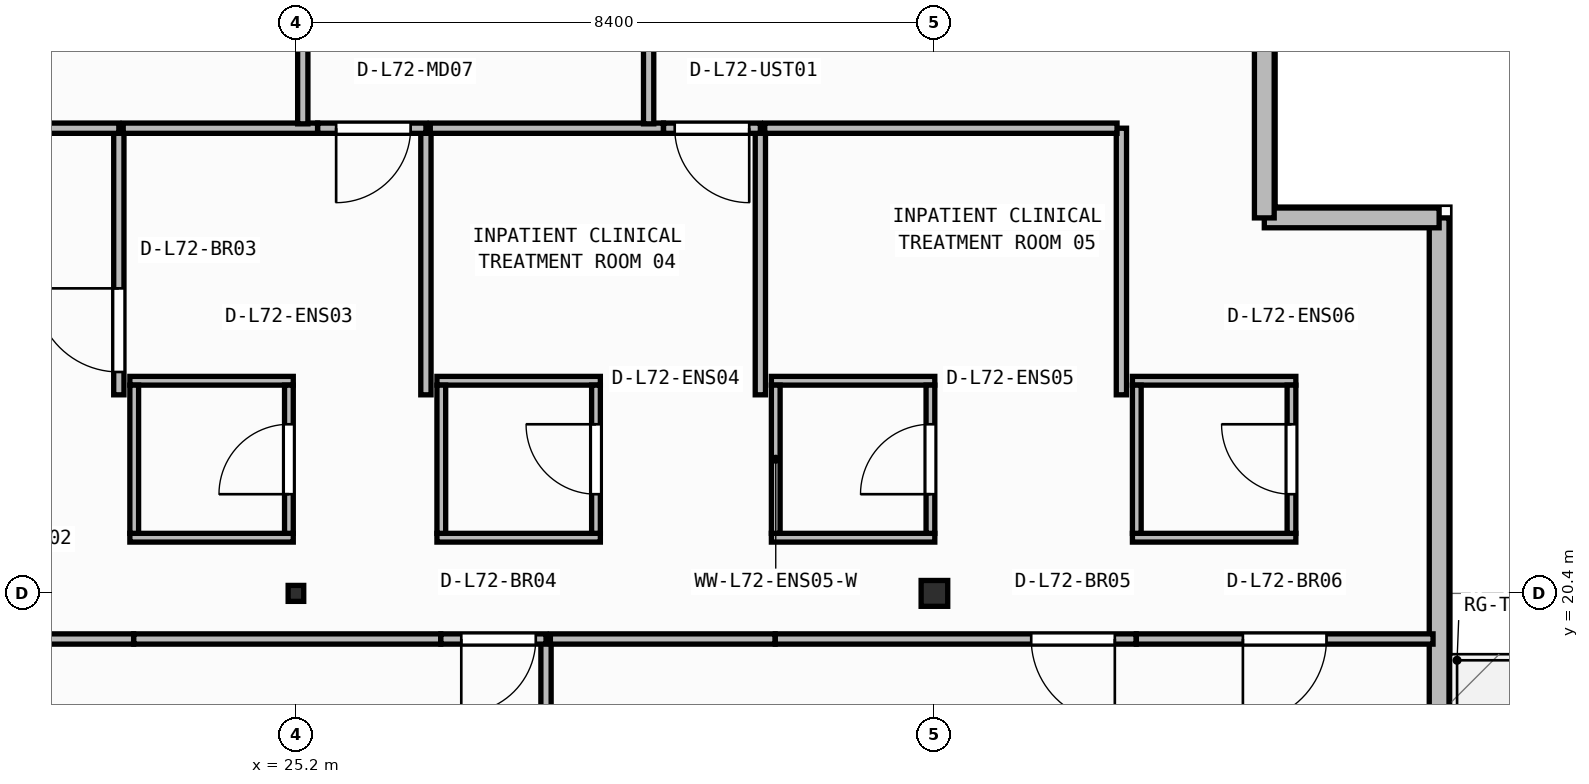
"""IFC4 building model, lengths in metres.
Left out: names, types, materials, properties, quantities, classifications, styles, units other than length and angle.
Written with IfcOpenShell. Run it as: python <this file> out.ifc"""

import sys

from ifc_helpers import new_model, si_unit, direction, frame, frame_2d, origin, origin_2d, place, context, subcontext, project, spatial, rectangle, i_section, extrude, element, fill, save


model = new_model("IFC4")
c1 = context("Model", 3, precision=1e-05, world=origin(), true_north=direction((0.0, 1.0)))
c2 = subcontext(c1, "Body", "Model", "MODEL_VIEW")
j1 = project(units=[si_unit("LENGTHUNIT", "METRE"), si_unit("PLANEANGLEUNIT", "RADIAN")], contexts=[c1])
p1 = place(None, origin())
s1 = spatial("IfcSite", under=j1, at=p1, CompositionType="ELEMENT")
p2 = place(p1, origin())
s2 = spatial("IfcBuilding", under=s1, at=p2, CompositionType="ELEMENT")
p3 = place(p2, frame((0.0, 0.0, 292.1)))
s3 = spatial("IfcBuildingStorey", under=s2, at=p3, CompositionType="ELEMENT", Elevation=292.1)
p4 = place(p3, frame((25.2, 20.4, 0.0), z_axis=(0.0, 0.0, 1.0), x_axis=(1.0, 0.0, 0.0)))
e1 = element("IfcColumn", 1, at=p4, inside=s3, PredefinedType="COLUMN", context=c2, shape_type="SweptSolid", body=[
    extrude(i_section(OverallWidth=0.205, OverallDepth=0.21, WebThickness=0.009, FlangeThickness=0.014, FilletRadius=0.011, at=origin_2d()), origin(), (0.0, 0.0, 1.0), 3.95),
])
p5 = place(p3, frame((33.6, 20.4, 0.0), z_axis=(0.0, 0.0, 1.0), x_axis=(1.0, 0.0, 0.0)))
e2 = element("IfcColumn", 2, at=p5, inside=s3, PredefinedType="COLUMN", context=c2, shape_type="SweptSolid", body=[
    extrude(i_section(OverallWidth=0.35, OverallDepth=0.34, WebThickness=0.016, FlangeThickness=0.028, at=origin_2d()), origin(), (0.0, 0.0, 1.0), 3.95),
])
p6 = place(p3, frame((40.24, 4.86, 0.0), z_axis=(0.0, 0.0, 1.0), x_axis=(0.0, 1.0, 0.0)))
e3 = element("IfcWall", 3, at=p6, inside=s3, PredefinedType="STANDARD", context=c2, shape_type="SweptSolid", body=[
    extrude(rectangle(XDim=20.48, YDim=0.26, at=frame_2d((10.24, 0.0))), origin(), (0.0, 0.0, 1.0), 3.71),
])
p7 = place(p6, frame((11.44, 0.0, 0.0)))
e4 = element("IfcOpeningElement", 4, at=p7, cuts=e3, PredefinedType="OPENING", context=c2, shape_type="SweptSolid", body=[
    extrude(rectangle(XDim=1.3, YDim=2.15, at=frame_2d((0.65, 1.075))), frame((0.0, 0.14, 0.0), z_axis=(0.0, -1.0, 0.0), x_axis=(1.0, 0.0, 0.0)), (0.0, 0.0, 1.0), 0.28),
])
p8 = place(p3, frame((40.24, 25.34, 0.0), z_axis=(0.0, 0.0, 1.0), x_axis=(-1.0, 0.0, 0.0)))
e5 = element("IfcWall", 5, at=p8, inside=s3, PredefinedType="STANDARD", context=c2, shape_type="SweptSolid", body=[
    extrude(rectangle(XDim=2.3, YDim=0.26, at=frame_2d((1.15, 0.0))), origin(), (0.0, 0.0, 1.0), 3.71),
])
p9 = place(p3, frame((37.94, 25.34, 0.0), z_axis=(0.0, 0.0, 1.0), x_axis=(0.0, 1.0, 0.0)))
e6 = element("IfcWall", 6, at=p9, inside=s3, PredefinedType="STANDARD", context=c2, shape_type="SweptSolid", body=[
    extrude(rectangle(XDim=2.321, YDim=0.26, at=frame_2d((1.161, 0.0))), origin(), (0.0, 0.0, 1.0), 3.71),
])
for number, where, z_axis, x_axis in (
    (7, (23.015, 21.133, 0.0), (0.0, 0.0, 1.0), (1.0, 0.0, 0.0)),
    (8, (23.015, 23.198, 0.0), (0.0, 0.0, 1.0), (1.0, 0.0, 0.0)),
):
    element("IfcWall", number, at=place(p3, frame(where, z_axis=z_axis, x_axis=x_axis)), inside=s3, PredefinedType="PARTITIONING", context=c2, shape_type="SweptSolid", body=[
        extrude(rectangle(XDim=2.15, YDim=0.115, at=frame_2d((1.075, 0.0))), origin(), (0.0, 0.0, 1.0), 3.71),
    ])
p10 = place(p3, frame((23.073, 21.19, 0.0), z_axis=(0.0, 0.0, 1.0), x_axis=(0.0, 1.0, 0.0)))
e9 = element("IfcWall", 9, at=p10, inside=s3, PredefinedType="PARTITIONING", context=c2, shape_type="SweptSolid", body=[
    extrude(rectangle(XDim=1.95, YDim=0.115, at=frame_2d((0.975, 0.0))), origin(), (0.0, 0.0, 1.0), 3.71),
])
p11 = place(p3, frame((25.107, 21.19, 0.0), z_axis=(0.0, 0.0, 1.0), x_axis=(0.0, 1.0, 0.0)))
e10 = element("IfcWall", 10, at=p11, inside=s3, PredefinedType="PARTITIONING", context=c2, shape_type="SweptSolid", body=[
    extrude(rectangle(XDim=1.95, YDim=0.115, at=frame_2d((0.975, 0.0))), origin(), (0.0, 0.0, 1.0), 3.157),
])
p12 = place(p11, frame((0.515, 0.0, 0.0)))
e11 = element("IfcOpeningElement", 11, at=p12, cuts=e10, PredefinedType="OPENING", context=c2, shape_type="SweptSolid", body=[
    extrude(rectangle(XDim=0.92, YDim=2.1, at=frame_2d((0.46, 1.05))), frame((0.0, 0.067, 0.0), z_axis=(0.0, -1.0, 0.0), x_axis=(1.0, 0.0, 0.0)), (0.0, 0.0, 1.0), 0.135),
])
for number, where, z_axis, x_axis in (
    (12, (27.055, 21.133, 0.0), (0.0, 0.0, 1.0), (1.0, 0.0, 0.0)),
    (13, (27.055, 23.198, 0.0), (0.0, 0.0, 1.0), (1.0, 0.0, 0.0)),
):
    element("IfcWall", number, at=place(p3, frame(where, z_axis=z_axis, x_axis=x_axis)), inside=s3, PredefinedType="PARTITIONING", context=c2, shape_type="SweptSolid", body=[
        extrude(rectangle(XDim=2.15, YDim=0.115, at=frame_2d((1.075, 0.0))), origin(), (0.0, 0.0, 1.0), 3.71),
    ])
p13 = place(p3, frame((27.113, 21.19, 0.0), z_axis=(0.0, 0.0, 1.0), x_axis=(0.0, 1.0, 0.0)))
e14 = element("IfcWall", 14, at=p13, inside=s3, PredefinedType="PARTITIONING", context=c2, shape_type="SweptSolid", body=[
    extrude(rectangle(XDim=1.95, YDim=0.115, at=frame_2d((0.975, 0.0))), origin(), (0.0, 0.0, 1.0), 3.71),
])
p14 = place(p3, frame((29.147, 21.19, 0.0), z_axis=(0.0, 0.0, 1.0), x_axis=(0.0, 1.0, 0.0)))
e15 = element("IfcWall", 15, at=p14, inside=s3, PredefinedType="PARTITIONING", context=c2, shape_type="SweptSolid", body=[
    extrude(rectangle(XDim=1.95, YDim=0.115, at=frame_2d((0.975, 0.0))), origin(), (0.0, 0.0, 1.0), 3.71),
])
p15 = place(p14, frame((0.515, 0.0, 0.0)))
e16 = element("IfcOpeningElement", 16, at=p15, cuts=e15, PredefinedType="OPENING", context=c2, shape_type="SweptSolid", body=[
    extrude(rectangle(XDim=0.92, YDim=2.1, at=frame_2d((0.46, 1.05))), frame((0.0, 0.067, 0.0), z_axis=(0.0, -1.0, 0.0), x_axis=(1.0, 0.0, 0.0)), (0.0, 0.0, 1.0), 0.135),
])
for number, where, z_axis, x_axis in (
    (17, (31.455, 21.133, 0.0), (0.0, 0.0, 1.0), (1.0, 0.0, 0.0)),
    (18, (31.455, 23.198, 0.0), (0.0, 0.0, 1.0), (1.0, 0.0, 0.0)),
):
    element("IfcWall", number, at=place(p3, frame(where, z_axis=z_axis, x_axis=x_axis)), inside=s3, PredefinedType="PARTITIONING", context=c2, shape_type="SweptSolid", body=[
        extrude(rectangle(XDim=2.15, YDim=0.115, at=frame_2d((1.075, 0.0))), origin(), (0.0, 0.0, 1.0), 3.71),
    ])
p16 = place(p3, frame((31.512, 21.19, 0.0), z_axis=(0.0, 0.0, 1.0), x_axis=(0.0, 1.0, 0.0)))
e19 = element("IfcWall", 19, at=p16, inside=s3, PredefinedType="PARTITIONING", context=c2, shape_type="SweptSolid", body=[
    extrude(rectangle(XDim=1.95, YDim=0.115, at=frame_2d((0.975, 0.0))), origin(), (0.0, 0.0, 1.0), 3.71),
])
p17 = place(p3, frame((33.548, 21.19, 0.0), z_axis=(0.0, 0.0, 1.0), x_axis=(0.0, 1.0, 0.0)))
e20 = element("IfcWall", 20, at=p17, inside=s3, PredefinedType="PARTITIONING", context=c2, shape_type="SweptSolid", body=[
    extrude(rectangle(XDim=1.95, YDim=0.115, at=frame_2d((0.975, 0.0))), origin(), (0.0, 0.0, 1.0), 3.71),
])
p18 = place(p17, frame((0.515, 0.0, 0.0)))
e21 = element("IfcOpeningElement", 21, at=p18, cuts=e20, PredefinedType="OPENING", context=c2, shape_type="SweptSolid", body=[
    extrude(rectangle(XDim=0.92, YDim=2.1, at=frame_2d((0.46, 1.05))), frame((0.0, 0.067, 0.0), z_axis=(0.0, -1.0, 0.0), x_axis=(1.0, 0.0, 0.0)), (0.0, 0.0, 1.0), 0.135),
])
for number, where, z_axis, x_axis in (
    (22, (36.205, 21.133, 0.0), (0.0, 0.0, 1.0), (1.0, 0.0, 0.0)),
    (23, (36.205, 23.198, 0.0), (0.0, 0.0, 1.0), (1.0, 0.0, 0.0)),
):
    element("IfcWall", number, at=place(p3, frame(where, z_axis=z_axis, x_axis=x_axis)), inside=s3, PredefinedType="PARTITIONING", context=c2, shape_type="SweptSolid", body=[
        extrude(rectangle(XDim=2.15, YDim=0.115, at=frame_2d((1.075, 0.0))), origin(), (0.0, 0.0, 1.0), 3.71),
    ])
p19 = place(p3, frame((36.262, 21.19, 0.0), z_axis=(0.0, 0.0, 1.0), x_axis=(0.0, 1.0, 0.0)))
e24 = element("IfcWall", 24, at=p19, inside=s3, PredefinedType="PARTITIONING", context=c2, shape_type="SweptSolid", body=[
    extrude(rectangle(XDim=1.95, YDim=0.115, at=frame_2d((0.975, 0.0))), origin(), (0.0, 0.0, 1.0), 3.71),
])
p20 = place(p3, frame((38.298, 21.19, 0.0), z_axis=(0.0, 0.0, 1.0), x_axis=(0.0, 1.0, 0.0)))
e25 = element("IfcWall", 25, at=p20, inside=s3, PredefinedType="PARTITIONING", context=c2, shape_type="SweptSolid", body=[
    extrude(rectangle(XDim=1.95, YDim=0.115, at=frame_2d((0.975, 0.0))), origin(), (0.0, 0.0, 1.0), 3.71),
])
p21 = place(p20, frame((0.515, 0.0, 0.0)))
e26 = element("IfcOpeningElement", 26, at=p21, cuts=e25, PredefinedType="OPENING", context=c2, shape_type="SweptSolid", body=[
    extrude(rectangle(XDim=0.92, YDim=2.1, at=frame_2d((0.46, 1.05))), frame((0.0, 0.067, 0.0), z_axis=(0.0, -1.0, 0.0), x_axis=(1.0, 0.0, 0.0)), (0.0, 0.0, 1.0), 0.135),
])
p22 = place(p3, frame((28.49, 14.76, 0.0), z_axis=(0.0, 0.0, 1.0), x_axis=(0.0, 1.0, 0.0)))
e27 = element("IfcWall", 27, at=p22, inside=s3, PredefinedType="PARTITIONING", context=c2, shape_type="SweptSolid", body=[
    extrude(rectangle(XDim=5.04, YDim=0.135, at=frame_2d((2.52, 0.0))), origin(), (0.0, 0.0, 1.0), 3.71),
])
p23 = place(p3, frame((23.065, 19.8, 0.0), z_axis=(0.0, 0.0, 1.0), x_axis=(-1.0, 0.0, 0.0)))
e28 = element("IfcWall", 28, at=p23, inside=s3, PredefinedType="PARTITIONING", context=c2, shape_type="SweptSolid", body=[
    extrude(rectangle(XDim=4.748, YDim=0.135, at=frame_2d((2.374, 0.0))), origin(), (0.0, 0.0, 1.0), 3.71),
])
p24 = place(p23, frame((1.499, 0.0, 0.0)))
e29 = element("IfcOpeningElement", 29, at=p24, cuts=e28, PredefinedType="OPENING", context=c2, shape_type="SweptSolid", body=[
    extrude(rectangle(XDim=1.1, YDim=2.1, at=frame_2d((0.55, 1.05))), frame((0.0, 0.077, 0.0), z_axis=(0.0, -1.0, 0.0), x_axis=(1.0, 0.0, 0.0)), (0.0, 0.0, 1.0), 0.155),
])
p25 = place(p3, frame((27.104, 19.8, 0.0), z_axis=(0.0, 0.0, 1.0), x_axis=(-1.0, 0.0, 0.0)))
e30 = element("IfcWall", 30, at=p25, inside=s3, PredefinedType="PARTITIONING", context=c2, shape_type="SweptSolid", body=[
    extrude(rectangle(XDim=4.038, YDim=0.135, at=frame_2d((2.019, 0.0))), origin(), (0.0, 0.0, 1.0), 3.71),
])
p26 = place(p3, frame((28.49, 19.8, 0.0), z_axis=(0.0, 0.0, 1.0), x_axis=(-1.0, 0.0, 0.0)))
e31 = element("IfcWall", 31, at=p26, inside=s3, PredefinedType="PARTITIONING", context=c2, shape_type="SweptSolid", body=[
    extrude(rectangle(XDim=1.383, YDim=0.135, at=frame_2d((0.692, 0.0))), origin(), (0.0, 0.0, 1.0), 3.71),
])
p27 = place(p26, frame((0.135, 0.0, 0.0)))
e32 = element("IfcOpeningElement", 32, at=p27, cuts=e31, PredefinedType="OPENING", context=c2, shape_type="SweptSolid", body=[
    extrude(rectangle(XDim=0.98, YDim=2.1, at=frame_2d((0.49, 1.05))), frame((0.0, 0.077, 0.0), z_axis=(0.0, -1.0, 0.0), x_axis=(1.0, 0.0, 0.0)), (0.0, 0.0, 1.0), 0.155),
])
p28 = place(p3, frame((31.505, 19.8, 0.0), z_axis=(0.0, 0.0, 1.0), x_axis=(-1.0, 0.0, 0.0)))
e33 = element("IfcWall", 33, at=p28, inside=s3, PredefinedType="PARTITIONING", context=c2, shape_type="SweptSolid", body=[
    extrude(rectangle(XDim=2.957, YDim=0.135, at=frame_2d((1.479, 0.0))), origin(), (0.0, 0.0, 1.0), 3.71),
])
p29 = place(p3, frame((36.255, 19.8, 0.0), z_axis=(0.0, 0.0, 1.0), x_axis=(-1.0, 0.0, 0.0)))
e34 = element("IfcWall", 34, at=p29, inside=s3, PredefinedType="PARTITIONING", context=c2, shape_type="SweptSolid", body=[
    extrude(rectangle(XDim=4.748, YDim=0.135, at=frame_2d((2.374, 0.0))), origin(), (0.0, 0.0, 1.0), 3.71),
])
p30 = place(p29, frame((0.281, 0.0, 0.0)))
e35 = element("IfcOpeningElement", 35, at=p30, cuts=e34, PredefinedType="OPENING", context=c2, shape_type="SweptSolid", body=[
    extrude(rectangle(XDim=1.1, YDim=2.1, at=frame_2d((0.55, 1.05))), frame((0.0, 0.077, 0.0), z_axis=(0.0, -1.0, 0.0), x_axis=(1.0, 0.0, 0.0)), (0.0, 0.0, 1.0), 0.155),
])
p31 = place(p3, frame((40.16, 19.8, 0.0), z_axis=(0.0, 0.0, 1.0), x_axis=(-1.0, 0.0, 0.0)))
e36 = element("IfcWall", 36, at=p31, inside=s3, PredefinedType="PARTITIONING", context=c2, shape_type="SweptSolid", body=[
    extrude(rectangle(XDim=3.903, YDim=0.135, at=frame_2d((1.952, 0.0))), origin(), (0.0, 0.0, 1.0), 3.71),
])
p32 = place(p31, frame((1.402, 0.0, 0.0)))
e37 = element("IfcOpeningElement", 37, at=p32, cuts=e36, PredefinedType="OPENING", context=c2, shape_type="SweptSolid", body=[
    extrude(rectangle(XDim=1.1, YDim=2.1, at=frame_2d((0.55, 1.05))), frame((0.0, 0.077, 0.0), z_axis=(0.0, -1.0, 0.0), x_axis=(1.0, 0.0, 0.0)), (0.0, 0.0, 1.0), 0.155),
])
p33 = place(p3, frame((22.87, 23.012, 0.0), z_axis=(0.0, 0.0, 1.0), x_axis=(0.0, 1.0, 0.0)))
e38 = element("IfcWall", 38, at=p33, inside=s3, PredefinedType="PARTITIONING", context=c2, shape_type="SweptSolid", body=[
    extrude(rectangle(XDim=3.508, YDim=0.135, at=frame_2d((1.754, 0.0))), origin(), (0.0, 0.0, 1.0), 3.71),
])
p34 = place(p33, frame((0.3, 0.0, 0.0)))
e39 = element("IfcOpeningElement", 39, at=p34, cuts=e38, PredefinedType="OPENING", context=c2, shape_type="SweptSolid", body=[
    extrude(rectangle(XDim=1.1, YDim=2.1, at=frame_2d((0.55, 1.05))), frame((0.0, 0.077, 0.0), z_axis=(0.0, -1.0, 0.0), x_axis=(1.0, 0.0, 0.0)), (0.0, 0.0, 1.0), 0.155),
])
p35 = place(p3, frame((22.87, 26.52, 0.0), z_axis=(0.0, 0.0, 1.0), x_axis=(-1.0, 0.0, 0.0)))
e40 = element("IfcWall", 40, at=p35, inside=s3, PredefinedType="PARTITIONING", context=c2, shape_type="SweptSolid", body=[
    extrude(rectangle(XDim=2.724, YDim=0.135, at=frame_2d((1.362, 0.0))), origin(), (0.0, 0.0, 1.0), 3.71),
])
p36 = place(p35, frame((1.393, 0.0, 0.0)))
e41 = element("IfcOpeningElement", 41, at=p36, cuts=e40, PredefinedType="OPENING", context=c2, shape_type="SweptSolid", body=[
    extrude(rectangle(XDim=1.1, YDim=2.1, at=frame_2d((0.55, 1.05))), frame((0.0, 0.077, 0.0), z_axis=(0.0, -1.0, 0.0), x_axis=(1.0, 0.0, 0.0)), (0.0, 0.0, 1.0), 0.155),
])
p37 = place(p3, frame((26.91, 23.012, 0.0), z_axis=(0.0, 0.0, 1.0), x_axis=(0.0, 1.0, 0.0)))
e42 = element("IfcWall", 42, at=p37, inside=s3, PredefinedType="PARTITIONING", context=c2, shape_type="SweptSolid", body=[
    extrude(rectangle(XDim=3.508, YDim=0.135, at=frame_2d((1.754, 0.0))), origin(), (0.0, 0.0, 1.0), 3.71),
])
p38 = place(p3, frame((25.485, 26.52, 0.0), z_axis=(0.0, 0.0, 1.0), x_axis=(-1.0, 0.0, 0.0)))
e43 = element("IfcWall", 43, at=p38, inside=s3, PredefinedType="PARTITIONING", context=c2, shape_type="SweptSolid", body=[
    extrude(rectangle(XDim=2.557, YDim=0.135, at=frame_2d((1.279, 0.0))), origin(), (0.0, 0.0, 1.0), 3.71),
])
p39 = place(p3, frame((26.91, 26.52, 0.0), z_axis=(0.0, 0.0, 1.0), x_axis=(-1.0, 0.0, 0.0)))
e44 = element("IfcWall", 44, at=p39, inside=s3, PredefinedType="PARTITIONING", context=c2, shape_type="SweptSolid", body=[
    extrude(rectangle(XDim=1.423, YDim=0.135, at=frame_2d((0.712, 0.0))), origin(), (0.0, 0.0, 1.0), 3.71),
])
p40 = place(p39, frame((0.201, 0.0, 0.0)))
e45 = element("IfcOpeningElement", 45, at=p40, cuts=e44, PredefinedType="OPENING", context=c2, shape_type="SweptSolid", body=[
    extrude(rectangle(XDim=0.98, YDim=2.1, at=frame_2d((0.49, 1.05))), frame((0.0, 0.077, 0.0), z_axis=(0.0, -1.0, 0.0), x_axis=(1.0, 0.0, 0.0)), (0.0, 0.0, 1.0), 0.155),
])
p41 = place(p3, frame((31.31, 23.012, 0.0), z_axis=(0.0, 0.0, 1.0), x_axis=(0.0, 1.0, 0.0)))
e46 = element("IfcWall", 46, at=p41, inside=s3, PredefinedType="PARTITIONING", context=c2, shape_type="SweptSolid", body=[
    extrude(rectangle(XDim=3.508, YDim=0.135, at=frame_2d((1.754, 0.0))), origin(), (0.0, 0.0, 1.0), 3.71),
])
p42 = place(p3, frame((30.035, 26.52, 0.0), z_axis=(0.0, 0.0, 1.0), x_axis=(-1.0, 0.0, 0.0)))
e47 = element("IfcWall", 47, at=p42, inside=s3, PredefinedType="PARTITIONING", context=c2, shape_type="SweptSolid", body=[
    extrude(rectangle(XDim=3.067, YDim=0.135, at=frame_2d((1.534, 0.0))), origin(), (0.0, 0.0, 1.0), 3.71),
])
p43 = place(p3, frame((31.31, 26.52, 0.0), z_axis=(0.0, 0.0, 1.0), x_axis=(-1.0, 0.0, 0.0)))
e48 = element("IfcWall", 48, at=p43, inside=s3, PredefinedType="PARTITIONING", context=c2, shape_type="SweptSolid", body=[
    extrude(rectangle(XDim=1.273, YDim=0.135, at=frame_2d((0.637, 0.0))), origin(), (0.0, 0.0, 1.0), 3.71),
])
p44 = place(p43, frame((0.147, 0.0, 0.0)))
e49 = element("IfcOpeningElement", 49, at=p44, cuts=e48, PredefinedType="OPENING", context=c2, shape_type="SweptSolid", body=[
    extrude(rectangle(XDim=0.98, YDim=2.1, at=frame_2d((0.49, 1.05))), frame((0.0, 0.077, 0.0), z_axis=(0.0, -1.0, 0.0), x_axis=(1.0, 0.0, 0.0)), (0.0, 0.0, 1.0), 0.155),
])
p45 = place(p3, frame((36.06, 23.012, 0.0), z_axis=(0.0, 0.0, 1.0), x_axis=(0.0, 1.0, 0.0)))
e50 = element("IfcWall", 50, at=p45, inside=s3, PredefinedType="PARTITIONING", context=c2, shape_type="SweptSolid", body=[
    extrude(rectangle(XDim=3.508, YDim=0.135, at=frame_2d((1.754, 0.0))), origin(), (0.0, 0.0, 1.0), 3.71),
])
p46 = place(p3, frame((36.002, 26.52, 0.0), z_axis=(0.0, 0.0, 1.0), x_axis=(-1.0, 0.0, 0.0)))
e51 = element("IfcWall", 51, at=p46, inside=s3, PredefinedType="PARTITIONING", context=c2, shape_type="SweptSolid", body=[
    extrude(rectangle(XDim=4.635, YDim=0.135, at=frame_2d((2.317, 0.0))), origin(), (0.0, 0.0, 1.0), 3.71),
])
p47 = place(p3, frame((25.29, 26.577, 0.0), z_axis=(0.0, 0.0, 1.0), x_axis=(0.0, 1.0, 0.0)))
e52 = element("IfcWall", 52, at=p47, inside=s3, PredefinedType="PARTITIONING", context=c2, shape_type="SweptSolid", body=[
    extrude(rectangle(XDim=3.051, YDim=0.135, at=frame_2d((1.525, 0.0))), origin(), (0.0, 0.0, 1.0), 3.157),
])
p48 = place(p3, frame((29.84, 26.577, 0.0), z_axis=(0.0, 0.0, 1.0), x_axis=(0.0, 1.0, 0.0)))
e53 = element("IfcWall", 53, at=p48, inside=s3, PredefinedType="PARTITIONING", context=c2, shape_type="SweptSolid", body=[
    extrude(rectangle(XDim=2.242, YDim=0.135, at=frame_2d((1.121, 0.0))), origin(), (0.0, 0.0, 1.0), 3.71),
])
p49 = place(p12, origin())
e54 = element("IfcDoor", 54, at=p49, inside=s3, OperationType="SINGLE_SWING_LEFT", PredefinedType="DOOR", context=c2, shape_type="SweptSolid", body=[
    extrude(rectangle(XDim=0.92, YDim=2.1, at=frame_2d((0.46, 1.05))), frame((0.0, 0.025, 0.0), z_axis=(0.0, -1.0, 0.0), x_axis=(1.0, 0.0, 0.0)), (0.0, 0.0, 1.0), 0.05),
])
fill(e11, e54)
p50 = place(p15, origin())
e55 = element("IfcDoor", 55, at=p50, inside=s3, OperationType="SINGLE_SWING_RIGHT", PredefinedType="DOOR", context=c2, shape_type="SweptSolid", body=[
    extrude(rectangle(XDim=0.92, YDim=2.1, at=frame_2d((0.46, 1.05))), frame((0.0, 0.025, 0.0), z_axis=(0.0, -1.0, 0.0), x_axis=(1.0, 0.0, 0.0)), (0.0, 0.0, 1.0), 0.05),
])
fill(e16, e55)
p51 = place(p18, origin())
e56 = element("IfcDoor", 56, at=p51, inside=s3, OperationType="SINGLE_SWING_LEFT", PredefinedType="DOOR", context=c2, shape_type="SweptSolid", body=[
    extrude(rectangle(XDim=0.92, YDim=2.1, at=frame_2d((0.46, 1.05))), frame((0.0, 0.025, 0.0), z_axis=(0.0, -1.0, 0.0), x_axis=(1.0, 0.0, 0.0)), (0.0, 0.0, 1.0), 0.05),
])
fill(e21, e56)
p52 = place(p21, origin())
e57 = element("IfcDoor", 57, at=p52, inside=s3, OperationType="SINGLE_SWING_RIGHT", PredefinedType="DOOR", context=c2, shape_type="SweptSolid", body=[
    extrude(rectangle(XDim=0.92, YDim=2.1, at=frame_2d((0.46, 1.05))), frame((0.0, 0.025, 0.0), z_axis=(0.0, -1.0, 0.0), x_axis=(1.0, 0.0, 0.0)), (0.0, 0.0, 1.0), 0.05),
])
fill(e26, e57)
p53 = place(p27, origin())
e58 = element("IfcDoor", 58, at=p53, inside=s3, OperationType="SINGLE_SWING_RIGHT", PredefinedType="DOOR", context=c2, shape_type="SweptSolid", body=[
    extrude(rectangle(XDim=0.98, YDim=2.1, at=frame_2d((0.49, 1.05))), frame((0.0, 0.025, 0.0), z_axis=(0.0, -1.0, 0.0), x_axis=(1.0, 0.0, 0.0)), (0.0, 0.0, 1.0), 0.05),
])
fill(e32, e58)
p54 = place(p30, origin())
e59 = element("IfcDoor", 59, at=p54, inside=s3, OperationType="SINGLE_SWING_LEFT", PredefinedType="DOOR", context=c2, shape_type="SweptSolid", body=[
    extrude(rectangle(XDim=1.1, YDim=2.1, at=frame_2d((0.55, 1.05))), frame((0.0, 0.025, 0.0), z_axis=(0.0, -1.0, 0.0), x_axis=(1.0, 0.0, 0.0)), (0.0, 0.0, 1.0), 0.05),
])
fill(e35, e59)
p55 = place(p32, origin())
e60 = element("IfcDoor", 60, at=p55, inside=s3, OperationType="SINGLE_SWING_RIGHT", PredefinedType="DOOR", context=c2, shape_type="SweptSolid", body=[
    extrude(rectangle(XDim=1.1, YDim=2.1, at=frame_2d((0.55, 1.05))), frame((0.0, 0.025, 0.0), z_axis=(0.0, -1.0, 0.0), x_axis=(1.0, 0.0, 0.0)), (0.0, 0.0, 1.0), 0.05),
])
fill(e37, e60)
p56 = place(p34, origin())
e61 = element("IfcDoor", 61, at=p56, inside=s3, OperationType="SINGLE_SWING_RIGHT", PredefinedType="DOOR", context=c2, shape_type="SweptSolid", body=[
    extrude(rectangle(XDim=1.1, YDim=2.1, at=frame_2d((0.55, 1.05))), frame((0.0, 0.025, 0.0), z_axis=(0.0, -1.0, 0.0), x_axis=(1.0, 0.0, 0.0)), (0.0, 0.0, 1.0), 0.05),
])
fill(e39, e61)
p57 = place(p40, origin())
e62 = element("IfcDoor", 62, at=p57, inside=s3, OperationType="SINGLE_SWING_RIGHT", PredefinedType="DOOR", context=c2, shape_type="SweptSolid", body=[
    extrude(rectangle(XDim=0.98, YDim=2.1, at=frame_2d((0.49, 1.05))), frame((0.0, 0.025, 0.0), z_axis=(0.0, -1.0, 0.0), x_axis=(1.0, 0.0, 0.0)), (0.0, 0.0, 1.0), 0.05),
])
fill(e45, e62)
p58 = place(p44, origin())
e63 = element("IfcDoor", 63, at=p58, inside=s3, OperationType="SINGLE_SWING_LEFT", PredefinedType="DOOR", context=c2, shape_type="SweptSolid", body=[
    extrude(rectangle(XDim=0.98, YDim=2.1, at=frame_2d((0.49, 1.05))), frame((0.0, 0.025, 0.0), z_axis=(0.0, -1.0, 0.0), x_axis=(1.0, 0.0, 0.0)), (0.0, 0.0, 1.0), 0.05),
])
fill(e49, e63)
save(model, sys.argv[1])
